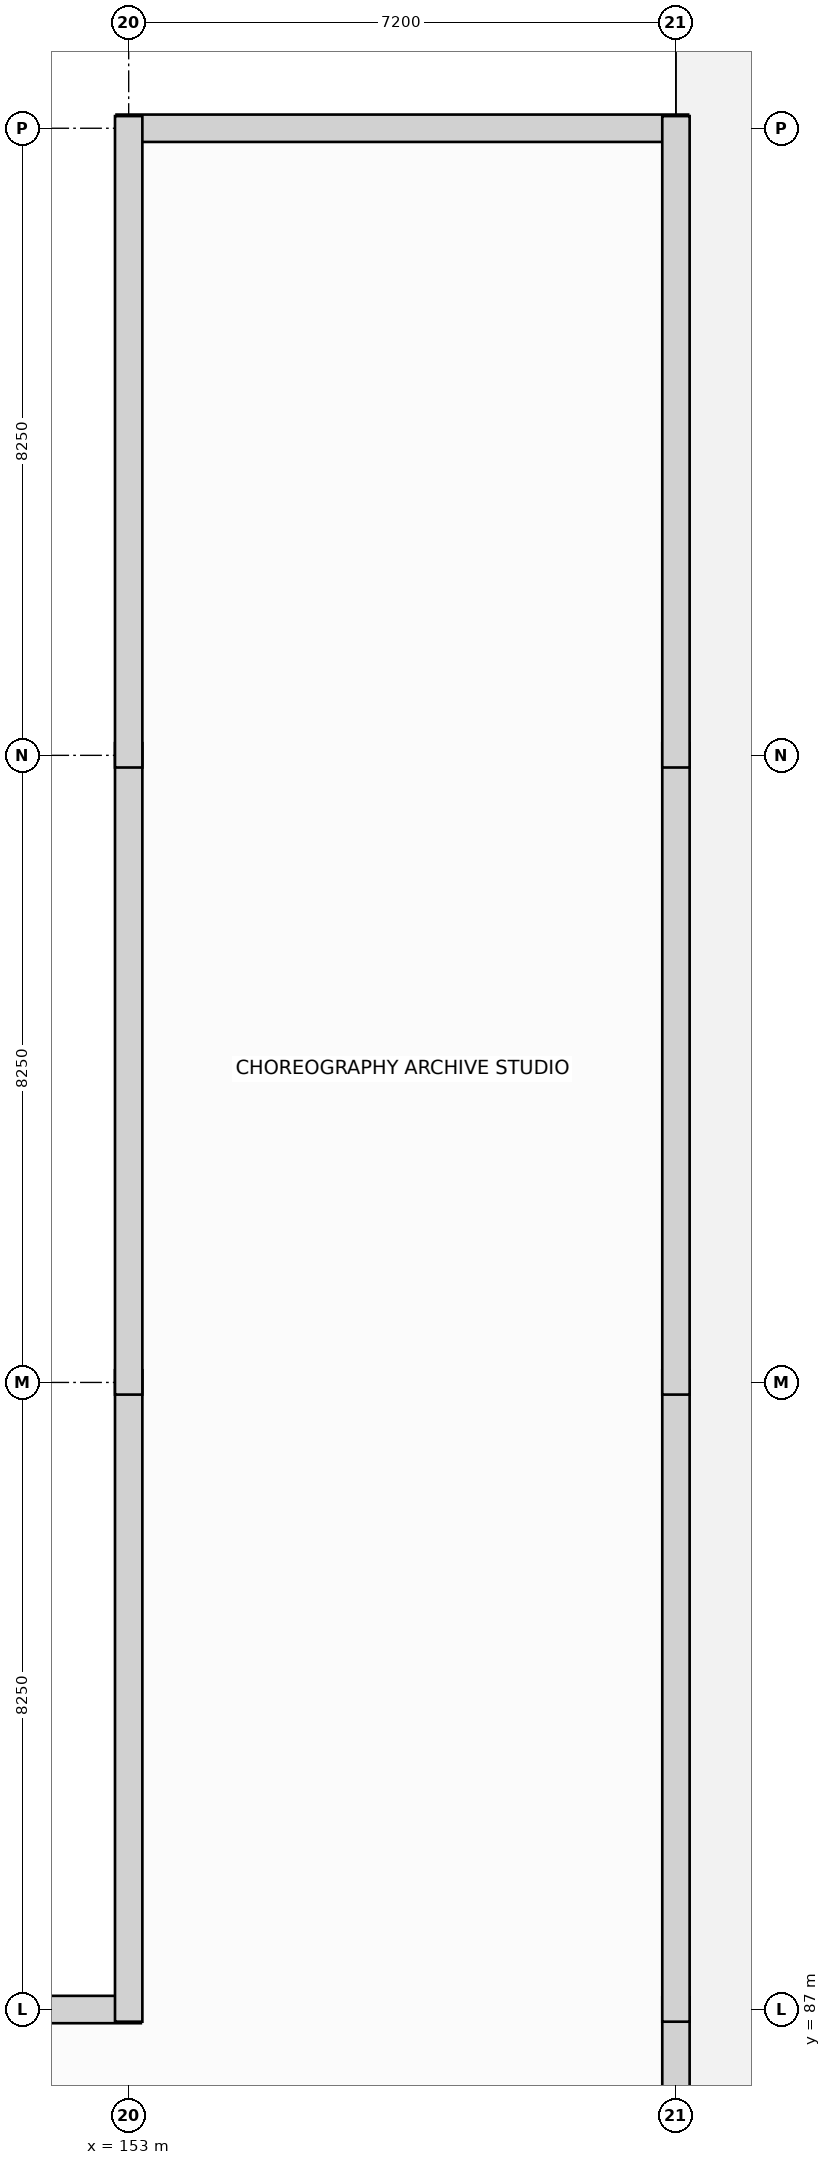
"""IFC4 building model, lengths in metres.
Left out: names, types, materials, properties, quantities, classifications, styles, units other than length and angle.
Written with IfcOpenShell. Run it as: python <this file> out.ifc"""

import sys

from ifc_helpers import new_model, si_unit, direction, frame, frame_2d, origin, place, context, subcontext, project, spatial, rectangle, extrude, element, save


model = new_model("IFC4")
c1 = context("Model", 3, precision=1e-05, world=origin(), true_north=direction((0.0, 1.0)))
c2 = subcontext(c1, "Body", "Model", "MODEL_VIEW")
j1 = project(units=[si_unit("LENGTHUNIT", "METRE"), si_unit("PLANEANGLEUNIT", "RADIAN")], contexts=[c1])
p1 = place(None, origin())
s1 = spatial("IfcSite", under=j1, at=p1, CompositionType="ELEMENT")
p2 = place(p1, origin())
s2 = spatial("IfcBuilding", under=s1, at=p2, CompositionType="ELEMENT")
p3 = place(p2, frame((0.0, 0.0, 16.8)))
s3 = spatial("IfcBuildingStorey", under=s2, at=p3, CompositionType="ELEMENT", Elevation=16.8)
p4 = place(p3, frame((146.045, 87.0, 0.0), z_axis=(0.0, 0.0, 1.0), x_axis=(1.0, 0.0, 0.0)))
e1 = element("IfcWall", 1, at=p4, inside=s3, PredefinedType="SOLIDWALL", context=c2, shape_type="SweptSolid", body=[
    extrude(rectangle(XDim=7.115, YDim=0.36, at=frame_2d((3.558, 0.0))), origin(), (0.0, 0.0, 1.0), 3.885),
])
p5 = place(p4, frame((2.658, 0.0, 0.9)))
e2 = element("IfcOpeningElement", 2, at=p5, cuts=e1, PredefinedType="OPENING", context=c2, shape_type="SweptSolid", body=[
    extrude(rectangle(XDim=1.8, YDim=2.3, at=frame_2d((0.9, 1.15))), frame((0.0, 0.19, 0.0), z_axis=(0.0, -1.0, 0.0), x_axis=(1.0, 0.0, 0.0)), (0.0, 0.0, 1.0), 0.38),
])
p6 = place(p3, frame((160.2, 87.16, 0.0), z_axis=(0.0, 0.0, 1.0), x_axis=(0.0, -1.0, 0.0)))
e3 = element("IfcWall", 3, at=p6, inside=s3, PredefinedType="SOLIDWALL", context=c2, shape_type="SweptSolid", body=[
    extrude(rectangle(XDim=9.32, YDim=0.36, at=frame_2d((4.66, 0.0))), origin(), (0.0, 0.0, 1.0), 4.485),
])
p7 = place(p6, frame((3.76, 0.0, 0.9)))
e4 = element("IfcOpeningElement", 4, at=p7, cuts=e3, PredefinedType="OPENING", context=c2, shape_type="SweptSolid", body=[
    extrude(rectangle(XDim=1.8, YDim=2.3, at=frame_2d((0.9, 1.15))), frame((0.0, 0.19, 0.0), z_axis=(0.0, -1.0, 0.0), x_axis=(1.0, 0.0, 0.0)), (0.0, 0.0, 1.0), 0.38),
])
p8 = place(p3, frame((152.84, 111.75, 0.0), z_axis=(0.0, 0.0, 1.0), x_axis=(1.0, 0.0, 0.0)))
e5 = element("IfcWall", 5, at=p8, inside=s3, PredefinedType="SOLIDWALL", context=c2, shape_type="SweptSolid", body=[
    extrude(rectangle(XDim=7.52, YDim=0.36, at=frame_2d((3.76, 0.0))), origin(), (0.0, 0.0, 1.0), 4.485),
])
for number, where, z_axis, x_axis in (
    (6, (153.0, 95.41, 0.0), (0.0, 0.0, 1.0), (0.0, -1.0, 0.0)),
    (7, (153.0, 103.66, 0.0), (0.0, 0.0, 1.0), (0.0, -1.0, 0.0)),
    (8, (153.0, 111.91, 0.0), (0.0, 0.0, 1.0), (0.0, -1.0, 0.0)),
    (9, (160.2, 86.84, 0.0), (0.0, 0.0, 1.0), (0.0, 1.0, 0.0)),
    (10, (160.2, 95.09, 0.0), (0.0, 0.0, 1.0), (0.0, 1.0, 0.0)),
    (11, (160.2, 103.34, 0.0), (0.0, 0.0, 1.0), (0.0, 1.0, 0.0)),
):
    element("IfcWall", number, at=place(p3, frame(where, z_axis=z_axis, x_axis=x_axis)), inside=s3, PredefinedType="SOLIDWALL", context=c2, shape_type="SweptSolid", body=[
        extrude(rectangle(XDim=8.57, YDim=0.36, at=frame_2d((4.285, 0.0))), origin(), (0.0, 0.0, 1.0), 4.485),
    ])
save(model, sys.argv[1])
